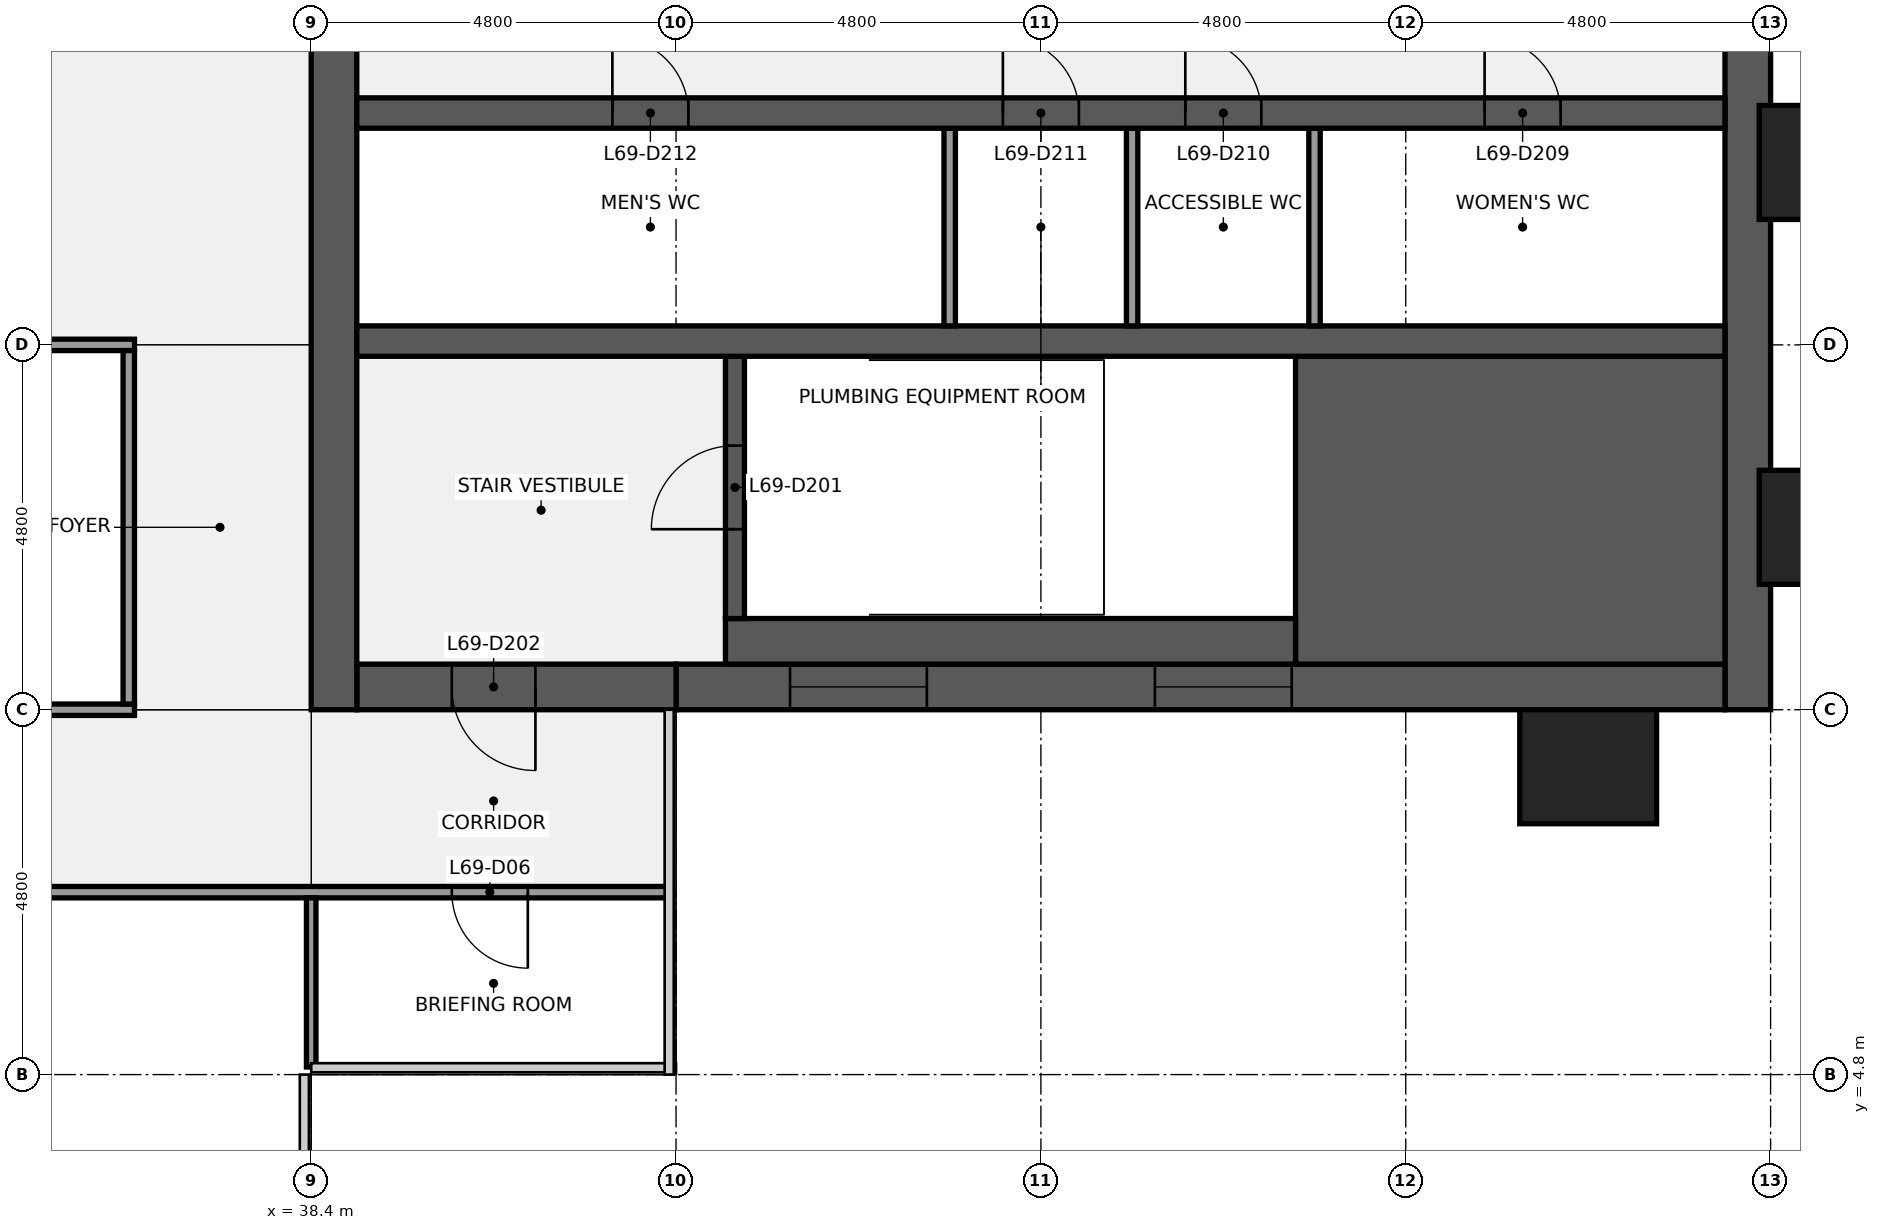
"""IFC4 building model, lengths in metres.
Left out: names, types, materials, properties, quantities, classifications, styles, units other than length and angle.
Written with IfcOpenShell. Run it as: python <this file> out.ifc"""

import sys

from ifc_helpers import new_model, si_unit, direction, frame, frame_2d, origin, origin_2d, place, context, subcontext, project, spatial, rectangle, extrude, element, fill, save


model = new_model("IFC4")
c1 = context("Model", 3, precision=1e-05, world=origin(), true_north=direction((0.0, 1.0)))
c2 = subcontext(c1, "Body", "Model", "MODEL_VIEW")
j1 = project(units=[si_unit("LENGTHUNIT", "METRE"), si_unit("PLANEANGLEUNIT", "RADIAN")], contexts=[c1])
p1 = place(None, origin())
s1 = spatial("IfcSite", under=j1, at=p1, CompositionType="ELEMENT")
p2 = place(p1, origin())
s2 = spatial("IfcBuilding", under=s1, at=p2, CompositionType="ELEMENT")
p3 = place(p2, frame((0.0, 0.0, 314.3)))
s3 = spatial("IfcBuildingStorey", under=s2, at=p3, CompositionType="ELEMENT", Elevation=314.3)
p4 = place(p3, frame((57.3, 38.4, 0.0), z_axis=(0.0, 0.0, 1.0), x_axis=(0.0, -1.0, 0.0)))
e1 = element("IfcWall", 1, at=p4, inside=s3, PredefinedType="SHEAR", context=c2, shape_type="SweptSolid", body=[
    extrude(rectangle(XDim=28.8, YDim=0.6, at=frame_2d((14.4, 0.0))), origin(), (0.0, 0.0, 1.0), 3.84),
])
p5 = place(p4, frame((18.45, 0.0, 0.9)))
e2 = element("IfcOpeningElement", 2, at=p5, cuts=e1, PredefinedType="OPENING", context=c2, shape_type="SweptSolid", body=[
    extrude(rectangle(XDim=1.5, YDim=1.5, at=frame_2d((0.75, 0.75))), frame((0.0, 0.31, 0.0), z_axis=(0.0, -1.0, 0.0), x_axis=(1.0, 0.0, 0.0)), (0.0, 0.0, 1.0), 0.62),
])
p6 = place(p4, frame((8.85, 0.0, 0.9)))
e3 = element("IfcOpeningElement", 3, at=p6, cuts=e1, PredefinedType="OPENING", context=c2, shape_type="SweptSolid", body=[
    extrude(rectangle(XDim=1.5, YDim=1.5, at=frame_2d((0.75, 0.75))), frame((0.0, 0.31, 0.0), z_axis=(0.0, -1.0, 0.0), x_axis=(1.0, 0.0, 0.0)), (0.0, 0.0, 1.0), 0.62),
])
p7 = place(p3, frame((57.0, 9.9, 0.0), z_axis=(0.0, 0.0, 1.0), x_axis=(-1.0, 0.0, 0.0)))
e4 = element("IfcWall", 4, at=p7, inside=s3, PredefinedType="SHEAR", context=c2, shape_type="SweptSolid", body=[
    extrude(rectangle(XDim=13.8, YDim=0.6, at=frame_2d((6.9, 0.0))), origin(), (0.0, 0.0, 1.0), 3.84),
])
p8 = place(p7, frame((5.7, 0.0, 0.9)))
e5 = element("IfcOpeningElement", 5, at=p8, cuts=e4, PredefinedType="OPENING", context=c2, shape_type="SweptSolid", body=[
    extrude(rectangle(XDim=1.8, YDim=1.5, at=frame_2d((0.9, 0.75))), frame((0.0, 0.31, 0.0), z_axis=(0.0, -1.0, 0.0), x_axis=(1.0, 0.0, 0.0)), (0.0, 0.0, 1.0), 0.62),
])
p9 = place(p7, frame((10.5, 0.0, 0.9)))
e6 = element("IfcOpeningElement", 6, at=p9, cuts=e4, PredefinedType="OPENING", context=c2, shape_type="SweptSolid", body=[
    extrude(rectangle(XDim=1.8, YDim=1.5, at=frame_2d((0.9, 0.75))), frame((0.0, 0.31, 0.0), z_axis=(0.0, -1.0, 0.0), x_axis=(1.0, 0.0, 0.0)), (0.0, 0.0, 1.0), 0.62),
])
p10 = place(p3, frame((43.2, 9.9, 0.0), z_axis=(0.0, 0.0, 1.0), x_axis=(-1.0, 0.0, 0.0)))
e7 = element("IfcWall", 7, at=p10, inside=s3, PredefinedType="SHEAR", context=c2, shape_type="SweptSolid", body=[
    extrude(rectangle(XDim=4.2, YDim=0.6, at=frame_2d((2.1, 0.0))), origin(), (0.0, 0.0, 1.0), 3.84),
])
p11 = place(p10, frame((1.85, 0.0, 0.0)))
e8 = element("IfcOpeningElement", 8, at=p11, cuts=e7, PredefinedType="OPENING", context=c2, shape_type="SweptSolid", body=[
    extrude(rectangle(XDim=1.1, YDim=2.1, at=frame_2d((0.55, 1.05))), frame((0.0, 0.31, 0.0), z_axis=(0.0, -1.0, 0.0), x_axis=(1.0, 0.0, 0.0)), (0.0, 0.0, 1.0), 0.62),
])
p12 = place(p3, frame((38.7, 9.6, 0.0), z_axis=(0.0, 0.0, 1.0), x_axis=(0.0, 1.0, 0.0)))
e9 = element("IfcWall", 9, at=p12, inside=s3, PredefinedType="SHEAR", context=c2, shape_type="SweptSolid", body=[
    extrude(rectangle(XDim=28.8, YDim=0.6, at=frame_2d((14.4, 0.0))), origin(), (0.0, 0.0, 1.0), 3.84),
])
p13 = place(p12, frame((8.7, 0.0, 0.0)))
e10 = element("IfcOpeningElement", 10, at=p13, cuts=e9, PredefinedType="OPENING", context=c2, shape_type="SweptSolid", body=[
    extrude(rectangle(XDim=1.8, YDim=2.1, at=frame_2d((0.9, 1.05))), frame((0.0, 0.31, 0.0), z_axis=(0.0, -1.0, 0.0), x_axis=(1.0, 0.0, 0.0)), (0.0, 0.0, 1.0), 0.62),
])
p14 = place(p12, frame((18.3, 0.0, 0.0)))
e11 = element("IfcOpeningElement", 11, at=p14, cuts=e9, PredefinedType="OPENING", context=c2, shape_type="SweptSolid", body=[
    extrude(rectangle(XDim=1.8, YDim=2.1, at=frame_2d((0.9, 1.05))), frame((0.0, 0.31, 0.0), z_axis=(0.0, -1.0, 0.0), x_axis=(1.0, 0.0, 0.0)), (0.0, 0.0, 1.0), 0.62),
])
p15 = place(p3, frame((51.35, 12.225, 0.0), z_axis=(0.0, 0.0, 1.0), x_axis=(1.0, 0.0, 0.0)))
e12 = element("IfcWall", 12, at=p15, inside=s3, PredefinedType="SHEAR", context=c2, shape_type="SweptSolid", body=[
    extrude(rectangle(XDim=5.65, YDim=4.05, at=frame_2d((2.825, 0.0))), origin(), (0.0, 0.0, 1.0), 3.84),
])
p16 = place(p3, frame((43.85, 10.5, 0.0), z_axis=(0.0, 0.0, 1.0), x_axis=(1.0, 0.0, 0.0)))
e13 = element("IfcWall", 13, at=p16, inside=s3, PredefinedType="SHEAR", context=c2, shape_type="SweptSolid", body=[
    extrude(rectangle(XDim=7.5, YDim=0.6, at=frame_2d((3.75, 0.0))), origin(), (0.0, 0.0, 1.0), 3.84),
])
p17 = place(p3, frame((43.975, 10.8, 0.0), z_axis=(0.0, 0.0, 1.0), x_axis=(0.0, 1.0, 0.0)))
e14 = element("IfcWall", 14, at=p17, inside=s3, PredefinedType="SHEAR", context=c2, shape_type="SweptSolid", body=[
    extrude(rectangle(XDim=3.45, YDim=0.25, at=frame_2d((1.725, 0.0))), origin(), (0.0, 0.0, 1.0), 3.84),
])
p18 = place(p17, frame((1.175, 0.0, 0.0)))
e15 = element("IfcOpeningElement", 15, at=p18, cuts=e14, PredefinedType="OPENING", context=c2, shape_type="SweptSolid", body=[
    extrude(rectangle(XDim=1.1, YDim=2.1, at=frame_2d((0.55, 1.05))), frame((0.0, 0.135, 0.0), z_axis=(0.0, -1.0, 0.0), x_axis=(1.0, 0.0, 0.0)), (0.0, 0.0, 1.0), 0.27),
])
p19 = place(p3, frame((39.0, 14.45, 0.0), z_axis=(0.0, 0.0, 1.0), x_axis=(1.0, 0.0, 0.0)))
e16 = element("IfcWall", 16, at=p19, inside=s3, PredefinedType="SHEAR", context=c2, shape_type="SweptSolid", body=[
    extrude(rectangle(XDim=18.0, YDim=0.4, at=frame_2d((9.0, 0.0))), origin(), (0.0, 0.0, 1.0), 3.84),
])
for number, where, z_axis, x_axis in (
    (17, (51.6, 14.65, 0.0), (0.0, 0.0, 1.0), (0.0, 1.0, 0.0)),
    (18, (49.2, 14.65, 0.0), (0.0, 0.0, 1.0), (0.0, 1.0, 0.0)),
    (19, (46.8, 14.65, 0.0), (0.0, 0.0, 1.0), (0.0, 1.0, 0.0)),
):
    element("IfcWall", number, at=place(p3, frame(where, z_axis=z_axis, x_axis=x_axis)), inside=s3, PredefinedType="PARTITIONING", context=c2, shape_type="SweptSolid", body=[
        extrude(rectangle(XDim=2.6, YDim=0.15, at=frame_2d((1.3, 0.0))), origin(), (0.0, 0.0, 1.0), 3.84),
    ])
p20 = place(p3, frame((39.0, 17.45, 0.0), z_axis=(0.0, 0.0, 1.0), x_axis=(1.0, 0.0, 0.0)))
e20 = element("IfcWall", 20, at=p20, inside=s3, PredefinedType="SHEAR", context=c2, shape_type="SweptSolid", body=[
    extrude(rectangle(XDim=18.0, YDim=0.4, at=frame_2d((9.0, 0.0))), origin(), (0.0, 0.0, 1.0), 3.84),
])
p21 = place(p20, frame((14.837, 0.0, 0.0)))
e21 = element("IfcOpeningElement", 21, at=p21, cuts=e20, PredefinedType="OPENING", context=c2, shape_type="SweptSolid", body=[
    extrude(rectangle(XDim=1.0, YDim=2.1, at=frame_2d((0.5, 1.05))), frame((0.0, 0.21, 0.0), z_axis=(0.0, -1.0, 0.0), x_axis=(1.0, 0.0, 0.0)), (0.0, 0.0, 1.0), 0.42),
])
p22 = place(p20, frame((10.9, 0.0, 0.0)))
e22 = element("IfcOpeningElement", 22, at=p22, cuts=e20, PredefinedType="OPENING", context=c2, shape_type="SweptSolid", body=[
    extrude(rectangle(XDim=1.0, YDim=2.1, at=frame_2d((0.5, 1.05))), frame((0.0, 0.21, 0.0), z_axis=(0.0, -1.0, 0.0), x_axis=(1.0, 0.0, 0.0)), (0.0, 0.0, 1.0), 0.42),
])
p23 = place(p20, frame((8.5, 0.0, 0.0)))
e23 = element("IfcOpeningElement", 23, at=p23, cuts=e20, PredefinedType="OPENING", context=c2, shape_type="SweptSolid", body=[
    extrude(rectangle(XDim=1.0, YDim=2.1, at=frame_2d((0.5, 1.05))), frame((0.0, 0.21, 0.0), z_axis=(0.0, -1.0, 0.0), x_axis=(1.0, 0.0, 0.0)), (0.0, 0.0, 1.0), 0.42),
])
p24 = place(p20, frame((3.363, 0.0, 0.0)))
e24 = element("IfcOpeningElement", 24, at=p24, cuts=e20, PredefinedType="OPENING", context=c2, shape_type="SweptSolid", body=[
    extrude(rectangle(XDim=1.0, YDim=2.1, at=frame_2d((0.5, 1.05))), frame((0.0, 0.21, 0.0), z_axis=(0.0, -1.0, 0.0), x_axis=(1.0, 0.0, 0.0)), (0.0, 0.0, 1.0), 0.42),
])
p25 = place(p3, frame((14.5, 7.2, 0.0), z_axis=(0.0, 0.0, 1.0), x_axis=(1.0, 0.0, 0.0)))
e25 = element("IfcWall", 25, at=p25, inside=s3, PredefinedType="PARTITIONING", context=c2, shape_type="SweptSolid", body=[
    extrude(rectangle(XDim=28.6, YDim=0.15, at=frame_2d((14.3, 0.0))), origin(), (0.0, 0.0, 1.0), 2.87),
])
p26 = place(p25, frame((1.85, 0.0, 0.0)))
e26 = element("IfcOpeningElement", 26, at=p26, cuts=e25, PredefinedType="OPENING", context=c2, shape_type="SweptSolid", body=[
    extrude(rectangle(XDim=1.0, YDim=2.1, at=frame_2d((0.5, 1.05))), frame((0.0, 0.085, 0.0), z_axis=(0.0, -1.0, 0.0), x_axis=(1.0, 0.0, 0.0)), (0.0, 0.0, 1.0), 0.17),
])
p27 = place(p25, frame((5.4, 0.0, 0.0)))
e27 = element("IfcOpeningElement", 27, at=p27, cuts=e25, PredefinedType="OPENING", context=c2, shape_type="SweptSolid", body=[
    extrude(rectangle(XDim=1.0, YDim=2.1, at=frame_2d((0.5, 1.05))), frame((0.0, 0.085, 0.0), z_axis=(0.0, -1.0, 0.0), x_axis=(1.0, 0.0, 0.0)), (0.0, 0.0, 1.0), 0.17),
])
p28 = place(p25, frame((9.0, 0.0, 0.0)))
e28 = element("IfcOpeningElement", 28, at=p28, cuts=e25, PredefinedType="OPENING", context=c2, shape_type="SweptSolid", body=[
    extrude(rectangle(XDim=1.0, YDim=2.1, at=frame_2d((0.5, 1.05))), frame((0.0, 0.085, 0.0), z_axis=(0.0, -1.0, 0.0), x_axis=(1.0, 0.0, 0.0)), (0.0, 0.0, 1.0), 0.17),
])
p29 = place(p25, frame((12.6, 0.0, 0.0)))
e29 = element("IfcOpeningElement", 29, at=p29, cuts=e25, PredefinedType="OPENING", context=c2, shape_type="SweptSolid", body=[
    extrude(rectangle(XDim=1.0, YDim=2.1, at=frame_2d((0.5, 1.05))), frame((0.0, 0.085, 0.0), z_axis=(0.0, -1.0, 0.0), x_axis=(1.0, 0.0, 0.0)), (0.0, 0.0, 1.0), 0.17),
])
p30 = place(p25, frame((18.6, 0.0, 0.0)))
e30 = element("IfcOpeningElement", 30, at=p30, cuts=e25, PredefinedType="OPENING", context=c2, shape_type="SweptSolid", body=[
    extrude(rectangle(XDim=1.0, YDim=2.1, at=frame_2d((0.5, 1.05))), frame((0.0, 0.085, 0.0), z_axis=(0.0, -1.0, 0.0), x_axis=(1.0, 0.0, 0.0)), (0.0, 0.0, 1.0), 0.17),
])
p31 = place(p25, frame((25.75, 0.0, 0.0)))
e31 = element("IfcOpeningElement", 31, at=p31, cuts=e25, PredefinedType="OPENING", context=c2, shape_type="SweptSolid", body=[
    extrude(rectangle(XDim=1.0, YDim=2.1, at=frame_2d((0.5, 1.05))), frame((0.0, 0.085, 0.0), z_axis=(0.0, -1.0, 0.0), x_axis=(1.0, 0.0, 0.0)), (0.0, 0.0, 1.0), 0.17),
])
p32 = place(p3, frame((21.525, 9.6, 0.0), z_axis=(0.0, 0.0, 1.0), x_axis=(1.0, 0.0, 0.0)))
e32 = element("IfcWall", 32, at=p32, inside=s3, PredefinedType="PARTITIONING", context=c2, shape_type="SweptSolid", body=[
    extrude(rectangle(XDim=14.55, YDim=0.15, at=frame_2d((7.275, 0.0))), origin(), (0.0, 0.0, 1.0), 2.87),
])
p33 = place(p32, frame((3.175, 0.0, 0.0)))
e33 = element("IfcOpeningElement", 33, at=p33, cuts=e32, PredefinedType="OPENING", context=c2, shape_type="SweptSolid", body=[
    extrude(rectangle(XDim=1.0, YDim=2.1, at=frame_2d((0.5, 1.05))), frame((0.0, 0.085, 0.0), z_axis=(0.0, -1.0, 0.0), x_axis=(1.0, 0.0, 0.0)), (0.0, 0.0, 1.0), 0.17),
])
p34 = place(p32, frame((10.375, 0.0, 0.0)))
e34 = element("IfcOpeningElement", 34, at=p34, cuts=e32, PredefinedType="OPENING", context=c2, shape_type="SweptSolid", body=[
    extrude(rectangle(XDim=1.0, YDim=2.1, at=frame_2d((0.5, 1.05))), frame((0.0, 0.085, 0.0), z_axis=(0.0, -1.0, 0.0), x_axis=(1.0, 0.0, 0.0)), (0.0, 0.0, 1.0), 0.17),
])
p35 = place(p3, frame((33.675, 14.4, 0.0), z_axis=(0.0, 0.0, 1.0), x_axis=(1.0, 0.0, 0.0)))
e35 = element("IfcWall", 35, at=p35, inside=s3, PredefinedType="PARTITIONING", context=c2, shape_type="SweptSolid", body=[
    extrude(rectangle(XDim=2.4, YDim=0.15, at=frame_2d((1.2, 0.0))), origin(), (0.0, 0.0, 1.0), 2.87),
])
p36 = place(p3, frame((36.0, 9.675, 0.0), z_axis=(0.0, 0.0, 1.0), x_axis=(0.0, 1.0, 0.0)))
e36 = element("IfcWall", 36, at=p36, inside=s3, PredefinedType="PARTITIONING", context=c2, shape_type="SweptSolid", body=[
    extrude(rectangle(XDim=4.65, YDim=0.15, at=frame_2d((2.325, 0.0))), origin(), (0.0, 0.0, 1.0), 2.87),
])
p37 = place(p3, frame((38.4, 4.9, 0.0), z_axis=(0.0, 0.0, 1.0), x_axis=(0.0, 1.0, 0.0)))
e37 = element("IfcWall", 37, at=p37, inside=s3, PredefinedType="PARTITIONING", context=c2, shape_type="SweptSolid", body=[
    extrude(rectangle(XDim=2.225, YDim=0.125, at=frame_2d((1.113, 0.0))), origin(), (0.0, 0.0, 1.0), 2.87),
])
for number, where, z_axis, x_axis in (
    (38, (55.2, 8.85, 0.0), (0.0, 0.0, 1.0), (1.0, 0.0, 0.0)),
    (39, (58.35, 12.0, 0.0), (0.0, 0.0, 1.0), (0.0, 1.0, 0.0)),
    (40, (58.35, 16.8, 0.0), (0.0, 0.0, 1.0), (0.0, 1.0, 0.0)),
):
    element("IfcColumn", number, at=place(p3, frame(where, z_axis=z_axis, x_axis=x_axis)), inside=s3, PredefinedType="PILASTER", context=c2, shape_type="SweptSolid", body=[
        extrude(rectangle(XDim=1.8, YDim=1.5, at=origin_2d()), origin(), (0.0, 0.0, 1.0), 4.0),
    ])
p38 = place(p18, origin())
e41 = element("IfcDoor", 41, at=p38, inside=s3, OperationType="SINGLE_SWING_LEFT", PredefinedType="DOOR", context=c2, shape_type="SweptSolid", body=[
    extrude(rectangle(XDim=1.1, YDim=2.1, at=frame_2d((0.55, 1.05))), frame((0.0, 0.025, 0.0), z_axis=(0.0, -1.0, 0.0), x_axis=(1.0, 0.0, 0.0)), (0.0, 0.0, 1.0), 0.05),
])
fill(e15, e41)
p39 = place(p11, origin())
e42 = element("IfcDoor", 42, at=p39, inside=s3, OperationType="SINGLE_SWING_LEFT", PredefinedType="DOOR", context=c2, shape_type="SweptSolid", body=[
    extrude(rectangle(XDim=1.1, YDim=2.1, at=frame_2d((0.55, 1.05))), frame((0.0, 0.025, 0.0), z_axis=(0.0, -1.0, 0.0), x_axis=(1.0, 0.0, 0.0)), (0.0, 0.0, 1.0), 0.05),
])
fill(e8, e42)
p40 = place(p21, origin())
e43 = element("IfcDoor", 43, at=p40, inside=s3, OperationType="SINGLE_SWING_LEFT", PredefinedType="DOOR", context=c2, shape_type="SweptSolid", body=[
    extrude(rectangle(XDim=1.0, YDim=2.1, at=frame_2d((0.5, 1.05))), frame((0.0, 0.025, 0.0), z_axis=(0.0, -1.0, 0.0), x_axis=(1.0, 0.0, 0.0)), (0.0, 0.0, 1.0), 0.05),
])
fill(e21, e43)
p41 = place(p22, origin())
e44 = element("IfcDoor", 44, at=p41, inside=s3, OperationType="SINGLE_SWING_LEFT", PredefinedType="DOOR", context=c2, shape_type="SweptSolid", body=[
    extrude(rectangle(XDim=1.0, YDim=2.1, at=frame_2d((0.5, 1.05))), frame((0.0, 0.025, 0.0), z_axis=(0.0, -1.0, 0.0), x_axis=(1.0, 0.0, 0.0)), (0.0, 0.0, 1.0), 0.05),
])
fill(e22, e44)
p42 = place(p23, origin())
e45 = element("IfcDoor", 45, at=p42, inside=s3, OperationType="SINGLE_SWING_LEFT", PredefinedType="DOOR", context=c2, shape_type="SweptSolid", body=[
    extrude(rectangle(XDim=1.0, YDim=2.1, at=frame_2d((0.5, 1.05))), frame((0.0, 0.025, 0.0), z_axis=(0.0, -1.0, 0.0), x_axis=(1.0, 0.0, 0.0)), (0.0, 0.0, 1.0), 0.05),
])
fill(e23, e45)
p43 = place(p24, origin())
e46 = element("IfcDoor", 46, at=p43, inside=s3, OperationType="SINGLE_SWING_LEFT", PredefinedType="DOOR", context=c2, shape_type="SweptSolid", body=[
    extrude(rectangle(XDim=1.0, YDim=2.1, at=frame_2d((0.5, 1.05))), frame((0.0, 0.025, 0.0), z_axis=(0.0, -1.0, 0.0), x_axis=(1.0, 0.0, 0.0)), (0.0, 0.0, 1.0), 0.05),
])
fill(e24, e46)
p44 = place(p8, origin())
e47 = element("IfcWindow", 47, at=p44, inside=s3, PartitioningType="SINGLE_PANEL", PredefinedType="WINDOW", context=c2, shape_type="SweptSolid", body=[
    extrude(rectangle(XDim=1.8, YDim=1.5, at=frame_2d((0.9, 0.75))), frame((0.0, 0.03, 0.0), z_axis=(0.0, -1.0, 0.0), x_axis=(1.0, 0.0, 0.0)), (0.0, 0.0, 1.0), 0.06),
])
fill(e5, e47)
p45 = place(p9, origin())
e48 = element("IfcWindow", 48, at=p45, inside=s3, PartitioningType="SINGLE_PANEL", PredefinedType="WINDOW", context=c2, shape_type="SweptSolid", body=[
    extrude(rectangle(XDim=1.8, YDim=1.5, at=frame_2d((0.9, 0.75))), frame((0.0, 0.03, 0.0), z_axis=(0.0, -1.0, 0.0), x_axis=(1.0, 0.0, 0.0)), (0.0, 0.0, 1.0), 0.06),
])
fill(e6, e48)
p46 = place(p31, origin())
e49 = element("IfcDoor", 49, at=p46, inside=s3, OperationType="SINGLE_SWING_RIGHT", PredefinedType="DOOR", context=c2, shape_type="SweptSolid", body=[
    extrude(rectangle(XDim=1.0, YDim=2.1, at=frame_2d((0.5, 1.05))), frame((0.0, 0.025, 0.0), z_axis=(0.0, -1.0, 0.0), x_axis=(1.0, 0.0, 0.0)), (0.0, 0.0, 1.0), 0.05),
])
fill(e31, e49)
save(model, sys.argv[1])
